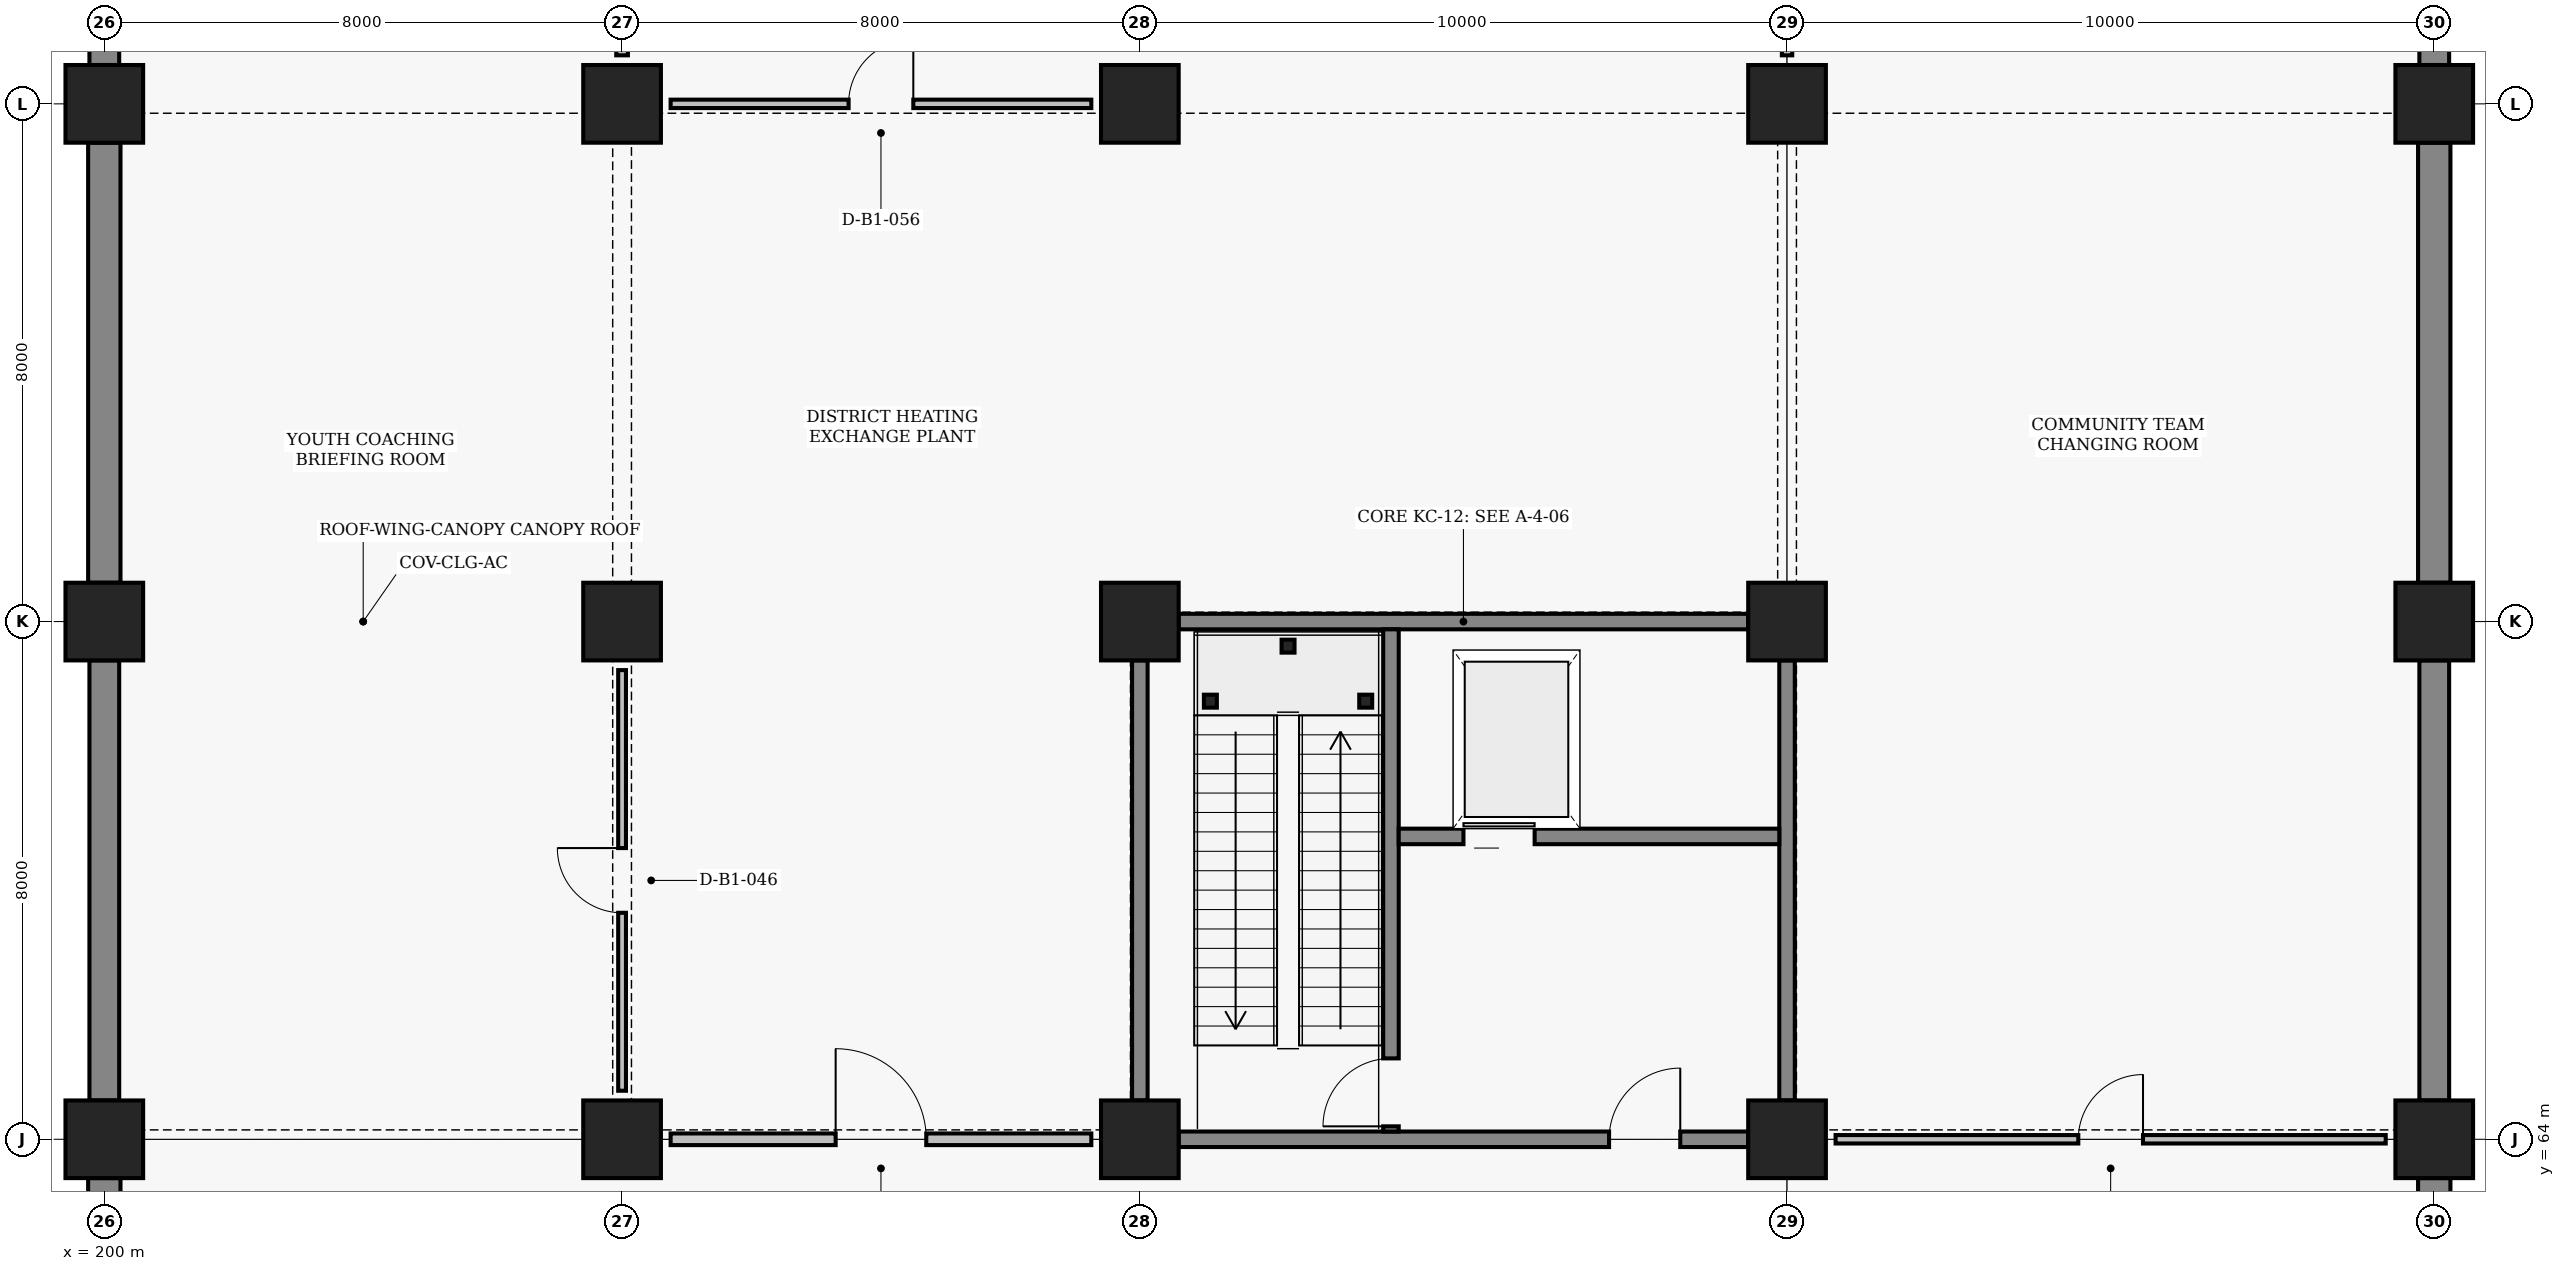
"""IFC4 building model, lengths in metres.
Left out: names, types, materials, properties, quantities, classifications, styles, units other than length and angle.
Written with IfcOpenShell. Run it as: python <this file> out.ifc"""

import sys

from ifc_helpers import new_model, si_unit, direction, frame, frame_2d, origin, origin_2d, place, context, subcontext, project, spatial, rectangle, hollow_rectangle, extrude, element, fill, save


model = new_model("IFC4")
c1 = context("Model", 3, precision=1e-05, world=origin(), true_north=direction((0.0, 1.0)))
c2 = subcontext(c1, "Body", "Model", "MODEL_VIEW")
j1 = project(units=[si_unit("LENGTHUNIT", "METRE"), si_unit("PLANEANGLEUNIT", "RADIAN")], contexts=[c1])
p1 = place(None, origin())
s1 = spatial("IfcSite", under=j1, at=p1, CompositionType="ELEMENT")
p2 = place(p1, origin())
s2 = spatial("IfcBuilding", under=s1, at=p2, CompositionType="ELEMENT")
p3 = place(p2, frame((0.0, 0.0, -5.4)))
s3 = spatial("IfcBuildingStorey", under=s2, at=p3, CompositionType="ELEMENT", Elevation=-5.4)
for number, where, z_axis, x_axis in (
    (1, (200.0, 64.0, 0.0), (0.0, 0.0, 1.0), (1.0, 0.0, 0.0)),
    (2, (200.0, 72.0, 0.0), (0.0, 0.0, 1.0), (1.0, 0.0, 0.0)),
    (3, (200.0, 80.0, 0.0), (0.0, 0.0, 1.0), (1.0, 0.0, 0.0)),
    (4, (208.0, 64.0, 0.0), (0.0, 0.0, 1.0), (1.0, 0.0, 0.0)),
    (5, (208.0, 72.0, 0.0), (0.0, 0.0, 1.0), (1.0, 0.0, 0.0)),
    (6, (208.0, 80.0, 0.0), (0.0, 0.0, 1.0), (1.0, 0.0, 0.0)),
    (7, (216.0, 64.0, 0.0), (0.0, 0.0, 1.0), (1.0, 0.0, 0.0)),
    (8, (216.0, 72.0, 0.0), (0.0, 0.0, 1.0), (1.0, 0.0, 0.0)),
    (9, (216.0, 80.0, 0.0), (0.0, 0.0, 1.0), (1.0, 0.0, 0.0)),
    (10, (226.0, 64.0, 0.0), (0.0, 0.0, 1.0), (1.0, 0.0, 0.0)),
    (11, (226.0, 72.0, 0.0), (0.0, 0.0, 1.0), (1.0, 0.0, 0.0)),
    (12, (226.0, 80.0, 0.0), (0.0, 0.0, 1.0), (1.0, 0.0, 0.0)),
    (13, (236.0, 64.0, 0.0), (0.0, 0.0, 1.0), (1.0, 0.0, 0.0)),
    (14, (236.0, 72.0, 0.0), (0.0, 0.0, 1.0), (1.0, 0.0, 0.0)),
    (15, (236.0, 80.0, 0.0), (0.0, 0.0, 1.0), (1.0, 0.0, 0.0)),
):
    element("IfcColumn", number, at=place(p3, frame(where, z_axis=z_axis, x_axis=x_axis)), inside=s3, PredefinedType="COLUMN", context=c2, shape_type="SweptSolid", body=[
        extrude(rectangle(XDim=1.2, YDim=1.2, at=origin_2d()), origin(), (0.0, 0.0, 1.0), 5.4),
    ])
p4 = place(p3, frame((200.0, 56.6, 0.0), z_axis=(0.0, 0.0, 1.0), x_axis=(0.0, 1.0, 0.0)))
e16 = element("IfcWall", 16, at=p4, inside=s3, PredefinedType="STANDARD", context=c2, shape_type="SweptSolid", body=[
    extrude(rectangle(XDim=6.8, YDim=0.5, at=frame_2d((3.4, 0.0))), origin(), (0.0, 0.0, 1.0), 4.24),
])
p5 = place(p3, frame((200.0, 64.6, 0.0), z_axis=(0.0, 0.0, 1.0), x_axis=(0.0, 1.0, 0.0)))
e17 = element("IfcWall", 17, at=p5, inside=s3, PredefinedType="STANDARD", context=c2, shape_type="SweptSolid", body=[
    extrude(rectangle(XDim=6.8, YDim=0.46, at=frame_2d((3.4, 0.0))), origin(), (0.0, 0.0, 1.0), 4.24),
])
p6 = place(p3, frame((200.0, 72.6, 0.0), z_axis=(0.0, 0.0, 1.0), x_axis=(0.0, 1.0, 0.0)))
e18 = element("IfcWall", 18, at=p6, inside=s3, PredefinedType="STANDARD", context=c2, shape_type="SweptSolid", body=[
    extrude(rectangle(XDim=6.8, YDim=0.5, at=frame_2d((3.4, 0.0))), origin(), (0.0, 0.0, 1.0), 3.69),
])
p7 = place(p3, frame((200.0, 80.6, 0.0), z_axis=(0.0, 0.0, 1.0), x_axis=(0.0, 1.0, 0.0)))
e19 = element("IfcWall", 19, at=p7, inside=s3, PredefinedType="STANDARD", context=c2, shape_type="SweptSolid", body=[
    extrude(rectangle(XDim=6.8, YDim=0.46, at=frame_2d((3.4, 0.0))), origin(), (0.0, 0.0, 1.0), 3.69),
])
p8 = place(p3, frame((236.0, 56.6, 0.0), z_axis=(0.0, 0.0, 1.0), x_axis=(0.0, 1.0, 0.0)))
e20 = element("IfcWall", 20, at=p8, inside=s3, PredefinedType="STANDARD", context=c2, shape_type="SweptSolid", body=[
    extrude(rectangle(XDim=6.8, YDim=0.5, at=frame_2d((3.4, 0.0))), origin(), (0.0, 0.0, 1.0), 4.24),
])
p9 = place(p3, frame((236.0, 64.6, 0.0), z_axis=(0.0, 0.0, 1.0), x_axis=(0.0, 1.0, 0.0)))
e21 = element("IfcWall", 21, at=p9, inside=s3, PredefinedType="STANDARD", context=c2, shape_type="SweptSolid", body=[
    extrude(rectangle(XDim=6.8, YDim=0.46, at=frame_2d((3.4, 0.0))), origin(), (0.0, 0.0, 1.0), 4.24),
])
p10 = place(p3, frame((236.0, 72.6, 0.0), z_axis=(0.0, 0.0, 1.0), x_axis=(0.0, 1.0, 0.0)))
e22 = element("IfcWall", 22, at=p10, inside=s3, PredefinedType="STANDARD", context=c2, shape_type="SweptSolid", body=[
    extrude(rectangle(XDim=6.8, YDim=0.5, at=frame_2d((3.4, 0.0))), origin(), (0.0, 0.0, 1.0), 4.24),
])
p11 = place(p3, frame((236.0, 80.6, 0.0), z_axis=(0.0, 0.0, 1.0), x_axis=(0.0, 1.0, 0.0)))
e23 = element("IfcWall", 23, at=p11, inside=s3, PredefinedType="STANDARD", context=c2, shape_type="SweptSolid", body=[
    extrude(rectangle(XDim=6.8, YDim=0.46, at=frame_2d((3.4, 0.0))), origin(), (0.0, 0.0, 1.0), 4.24),
])
p12 = place(p3, frame((216.6, 64.0, 0.0), z_axis=(0.0, 0.0, 1.0), x_axis=(1.0, 0.0, 0.0)))
e24 = element("IfcWall", 24, at=p12, inside=s3, PredefinedType="SHEAR", context=c2, shape_type="SweptSolid", body=[
    extrude(rectangle(XDim=8.8, YDim=0.24, at=frame_2d((4.4, 0.0))), origin(), (0.0, 0.0, 1.0), 4.59),
])
p13 = place(p12, frame((6.65, 0.0, 0.0)))
e25 = element("IfcOpeningElement", 25, at=p13, cuts=e24, PredefinedType="OPENING", context=c2, shape_type="SweptSolid", body=[
    extrude(rectangle(XDim=1.1, YDim=2.2, at=frame_2d((0.55, 1.1))), frame((0.0, 0.13, 0.0), z_axis=(0.0, -1.0, 0.0), x_axis=(1.0, 0.0, 0.0)), (0.0, 0.0, 1.0), 0.26),
])
p14 = place(p3, frame((216.6, 72.0, 0.0), z_axis=(0.0, 0.0, 1.0), x_axis=(1.0, 0.0, 0.0)))
e26 = element("IfcWall", 26, at=p14, inside=s3, PredefinedType="SHEAR", context=c2, shape_type="SweptSolid", body=[
    extrude(rectangle(XDim=8.8, YDim=0.24, at=frame_2d((4.4, 0.0))), origin(), (0.0, 0.0, 1.0), 3.69),
])
p15 = place(p3, frame((216.0, 64.6, 0.0), z_axis=(0.0, 0.0, 1.0), x_axis=(0.0, 1.0, 0.0)))
e27 = element("IfcWall", 27, at=p15, inside=s3, PredefinedType="SHEAR", context=c2, shape_type="SweptSolid", body=[
    extrude(rectangle(XDim=6.8, YDim=0.24, at=frame_2d((3.4, 0.0))), origin(), (0.0, 0.0, 1.0), 3.69),
])
p16 = place(p3, frame((226.0, 64.6, 0.0), z_axis=(0.0, 0.0, 1.0), x_axis=(0.0, 1.0, 0.0)))
e28 = element("IfcWall", 28, at=p16, inside=s3, PredefinedType="SHEAR", context=c2, shape_type="SweptSolid", body=[
    extrude(rectangle(XDim=6.8, YDim=0.24, at=frame_2d((3.4, 0.0))), origin(), (0.0, 0.0, 1.0), 4.39),
])
p17 = place(p3, frame((219.88, 64.12, 0.0), z_axis=(0.0, 0.0, 1.0), x_axis=(0.0, 1.0, 0.0)))
e29 = element("IfcWall", 29, at=p17, inside=s3, PredefinedType="SHEAR", context=c2, shape_type="SweptSolid", body=[
    extrude(rectangle(XDim=7.76, YDim=0.24, at=frame_2d((3.88, 0.0))), origin(), (0.0, 0.0, 1.0), 4.59),
])
p18 = place(p17, frame((0.08, 0.0, 0.0)))
e30 = element("IfcOpeningElement", 30, at=p18, cuts=e29, PredefinedType="OPENING", context=c2, shape_type="SweptSolid", body=[
    extrude(rectangle(XDim=1.05, YDim=2.15, at=frame_2d((0.525, 1.075))), frame((0.0, 0.13, 0.0), z_axis=(0.0, -1.0, 0.0), x_axis=(1.0, 0.0, 0.0)), (0.0, 0.0, 1.0), 0.26),
])
p19 = place(p3, frame((220.0, 68.68, 0.0), z_axis=(0.0, 0.0, 1.0), x_axis=(1.0, 0.0, 0.0)))
e31 = element("IfcWall", 31, at=p19, inside=s3, PredefinedType="SHEAR", context=c2, shape_type="SweptSolid", body=[
    extrude(rectangle(XDim=5.88, YDim=0.24, at=frame_2d((2.94, 0.0))), origin(), (0.0, 0.0, 1.0), 4.39),
])
p20 = place(p19, frame((1.0, 0.0, 0.0)))
e32 = element("IfcOpeningElement", 32, at=p20, cuts=e31, PredefinedType="OPENING", context=c2, shape_type="SweptSolid", body=[
    extrude(rectangle(XDim=1.1, YDim=2.15, at=frame_2d((0.55, 1.075))), frame((0.0, 0.13, 0.0), z_axis=(0.0, -1.0, 0.0), x_axis=(1.0, 0.0, 0.0)), (0.0, 0.0, 1.0), 0.26),
])
for number, where, z_axis, x_axis in (
    (33, (217.09, 70.77, 0.0), (0.0, 0.0, 1.0), (1.0, 0.0, 0.0)),
    (34, (219.49, 70.77, 0.0), (0.0, 0.0, 1.0), (1.0, 0.0, 0.0)),
    (35, (218.29, 71.62, 0.0), (0.0, 0.0, 1.0), (1.0, 0.0, 0.0)),
):
    element("IfcColumn", number, at=place(p3, frame(where, z_axis=z_axis, x_axis=x_axis)), inside=s3, PredefinedType="COLUMN", context=c2, shape_type="SweptSolid", body=[
        extrude(hollow_rectangle(XDim=0.2, YDim=0.2, WallThickness=0.009, at=origin_2d()), origin(), (0.0, 0.0, 1.0), 2.5),
    ])
p21 = place(p3, frame((208.0, 64.75, 0.0), z_axis=(0.0, 0.0, 1.0), x_axis=(0.0, 1.0, 0.0)))
e36 = element("IfcWall", 36, at=p21, inside=s3, PredefinedType="PARTITIONING", context=c2, shape_type="SweptSolid", body=[
    extrude(rectangle(XDim=6.5, YDim=0.12, at=frame_2d((3.25, 0.0))), origin(), (0.0, 0.0, 1.0), 3.69),
])
p22 = place(p21, frame((2.75, 0.0, 0.0)))
e37 = element("IfcOpeningElement", 37, at=p22, cuts=e36, PredefinedType="OPENING", context=c2, shape_type="SweptSolid", body=[
    extrude(rectangle(XDim=1.0, YDim=2.1, at=frame_2d((0.5, 1.05))), frame((0.0, 0.07, 0.0), z_axis=(0.0, -1.0, 0.0), x_axis=(1.0, 0.0, 0.0)), (0.0, 0.0, 1.0), 0.14),
])
p23 = place(p3, frame((208.0, 80.75, 0.0), z_axis=(0.0, 0.0, 1.0), x_axis=(0.0, 1.0, 0.0)))
e38 = element("IfcWall", 38, at=p23, inside=s3, PredefinedType="PARTITIONING", context=c2, shape_type="SweptSolid", body=[
    extrude(rectangle(XDim=6.5, YDim=0.18, at=frame_2d((3.25, 0.0))), origin(), (0.0, 0.0, 1.0), 3.69),
])
p24 = place(p23, frame((2.55, 0.0, 0.0)))
e39 = element("IfcOpeningElement", 39, at=p24, cuts=e38, PredefinedType="OPENING", context=c2, shape_type="SweptSolid", body=[
    extrude(rectangle(XDim=1.4, YDim=2.2, at=frame_2d((0.7, 1.1))), frame((0.0, 0.1, 0.0), z_axis=(0.0, -1.0, 0.0), x_axis=(1.0, 0.0, 0.0)), (0.0, 0.0, 1.0), 0.2),
])
p25 = place(p3, frame((208.75, 64.0, 0.0), z_axis=(0.0, 0.0, 1.0), x_axis=(1.0, 0.0, 0.0)))
e40 = element("IfcWall", 40, at=p25, inside=s3, PredefinedType="PARTITIONING", context=c2, shape_type="SweptSolid", body=[
    extrude(rectangle(XDim=6.5, YDim=0.18, at=frame_2d((3.25, 0.0))), origin(), (0.0, 0.0, 1.0), 4.49),
])
p26 = place(p25, frame((2.55, 0.0, 0.0)))
e41 = element("IfcOpeningElement", 41, at=p26, cuts=e40, PredefinedType="OPENING", context=c2, shape_type="SweptSolid", body=[
    extrude(rectangle(XDim=1.4, YDim=2.2, at=frame_2d((0.7, 1.1))), frame((0.0, 0.1, 0.0), z_axis=(0.0, -1.0, 0.0), x_axis=(1.0, 0.0, 0.0)), (0.0, 0.0, 1.0), 0.2),
])
p27 = place(p3, frame((208.75, 80.0, 0.0), z_axis=(0.0, 0.0, 1.0), x_axis=(1.0, 0.0, 0.0)))
e42 = element("IfcWall", 42, at=p27, inside=s3, PredefinedType="PARTITIONING", context=c2, shape_type="SweptSolid", body=[
    extrude(rectangle(XDim=6.5, YDim=0.13, at=frame_2d((3.25, 0.0))), origin(), (0.0, 0.0, 1.0), 3.69),
])
p28 = place(p27, frame((2.75, 0.0, 0.0)))
e43 = element("IfcOpeningElement", 43, at=p28, cuts=e42, PredefinedType="OPENING", context=c2, shape_type="SweptSolid", body=[
    extrude(rectangle(XDim=1.0, YDim=2.1, at=frame_2d((0.5, 1.05))), frame((0.0, 0.075, 0.0), z_axis=(0.0, -1.0, 0.0), x_axis=(1.0, 0.0, 0.0)), (0.0, 0.0, 1.0), 0.15),
])
p29 = place(p3, frame((226.75, 64.0, 0.0), z_axis=(0.0, 0.0, 1.0), x_axis=(1.0, 0.0, 0.0)))
e44 = element("IfcWall", 44, at=p29, inside=s3, PredefinedType="PARTITIONING", context=c2, shape_type="SweptSolid", body=[
    extrude(rectangle(XDim=8.5, YDim=0.13, at=frame_2d((4.25, 0.0))), origin(), (0.0, 0.0, 1.0), 4.39),
])
p30 = place(p29, frame((3.75, 0.0, 0.0)))
e45 = element("IfcOpeningElement", 45, at=p30, cuts=e44, PredefinedType="OPENING", context=c2, shape_type="SweptSolid", body=[
    extrude(rectangle(XDim=1.0, YDim=2.1, at=frame_2d((0.5, 1.05))), frame((0.0, 0.075, 0.0), z_axis=(0.0, -1.0, 0.0), x_axis=(1.0, 0.0, 0.0)), (0.0, 0.0, 1.0), 0.15),
])
p31 = place(p3, frame((226.0, 80.75, 0.0), z_axis=(0.0, 0.0, 1.0), x_axis=(0.0, 1.0, 0.0)))
e46 = element("IfcWall", 46, at=p31, inside=s3, PredefinedType="PARTITIONING", context=c2, shape_type="SweptSolid", body=[
    extrude(rectangle(XDim=6.5, YDim=0.16, at=frame_2d((3.25, 0.0))), origin(), (0.0, 0.0, 1.0), 4.39),
])
p32 = place(p31, frame((2.775, 0.0, 0.0)))
e47 = element("IfcOpeningElement", 47, at=p32, cuts=e46, PredefinedType="OPENING", context=c2, shape_type="SweptSolid", body=[
    extrude(rectangle(XDim=0.95, YDim=2.1, at=frame_2d((0.475, 1.05))), frame((0.0, 0.09, 0.0), z_axis=(0.0, -1.0, 0.0), x_axis=(1.0, 0.0, 0.0)), (0.0, 0.0, 1.0), 0.18),
])
p33 = place(p13, origin())
e48 = element("IfcDoor", 48, at=p33, inside=s3, OperationType="SINGLE_SWING_RIGHT", PredefinedType="DOOR", context=c2, shape_type="SweptSolid", body=[
    extrude(rectangle(XDim=1.1, YDim=2.2, at=frame_2d((0.55, 1.1))), frame((0.0, 0.025, 0.0), z_axis=(0.0, -1.0, 0.0), x_axis=(1.0, 0.0, 0.0)), (0.0, 0.0, 1.0), 0.05),
])
fill(e25, e48)
p34 = place(p18, origin())
e49 = element("IfcDoor", 49, at=p34, inside=s3, OperationType="SINGLE_SWING_LEFT", PredefinedType="DOOR", context=c2, shape_type="SweptSolid", body=[
    extrude(rectangle(XDim=1.05, YDim=2.15, at=frame_2d((0.525, 1.075))), frame((0.0, 0.025, 0.0), z_axis=(0.0, -1.0, 0.0), x_axis=(1.0, 0.0, 0.0)), (0.0, 0.0, 1.0), 0.05),
])
fill(e30, e49)
p35 = place(p20, origin())
e50 = element("IfcDoor", 50, at=p35, inside=s3, OperationType="SLIDING_TO_LEFT", PredefinedType="DOOR", context=c2, shape_type="SweptSolid", body=[
    extrude(rectangle(XDim=1.1, YDim=2.15, at=frame_2d((0.55, 1.075))), frame((0.0, 0.025, 0.0), z_axis=(0.0, -1.0, 0.0), x_axis=(1.0, 0.0, 0.0)), (0.0, 0.0, 1.0), 0.05),
])
fill(e32, e50)
p36 = place(p22, origin())
e51 = element("IfcDoor", 51, at=p36, inside=s3, OperationType="SINGLE_SWING_RIGHT", PredefinedType="DOOR", context=c2, shape_type="SweptSolid", body=[
    extrude(rectangle(XDim=1.0, YDim=2.1, at=frame_2d((0.5, 1.05))), frame((0.0, 0.025, 0.0), z_axis=(0.0, -1.0, 0.0), x_axis=(1.0, 0.0, 0.0)), (0.0, 0.0, 1.0), 0.05),
])
fill(e37, e51)
p37 = place(p26, origin())
e52 = element("IfcDoor", 52, at=p37, inside=s3, OperationType="SINGLE_SWING_LEFT", PredefinedType="DOOR", context=c2, shape_type="SweptSolid", body=[
    extrude(rectangle(XDim=1.4, YDim=2.2, at=frame_2d((0.7, 1.1))), frame((0.0, 0.025, 0.0), z_axis=(0.0, -1.0, 0.0), x_axis=(1.0, 0.0, 0.0)), (0.0, 0.0, 1.0), 0.05),
])
fill(e41, e52)
p38 = place(p28, origin())
e53 = element("IfcDoor", 53, at=p38, inside=s3, OperationType="SINGLE_SWING_RIGHT", PredefinedType="DOOR", context=c2, shape_type="SweptSolid", body=[
    extrude(rectangle(XDim=1.0, YDim=2.1, at=frame_2d((0.5, 1.05))), frame((0.0, 0.025, 0.0), z_axis=(0.0, -1.0, 0.0), x_axis=(1.0, 0.0, 0.0)), (0.0, 0.0, 1.0), 0.05),
])
fill(e43, e53)
p39 = place(p30, origin())
e54 = element("IfcDoor", 54, at=p39, inside=s3, OperationType="SINGLE_SWING_RIGHT", PredefinedType="DOOR", context=c2, shape_type="SweptSolid", body=[
    extrude(rectangle(XDim=1.0, YDim=2.1, at=frame_2d((0.5, 1.05))), frame((0.0, 0.025, 0.0), z_axis=(0.0, -1.0, 0.0), x_axis=(1.0, 0.0, 0.0)), (0.0, 0.0, 1.0), 0.05),
])
fill(e45, e54)
save(model, sys.argv[1])
